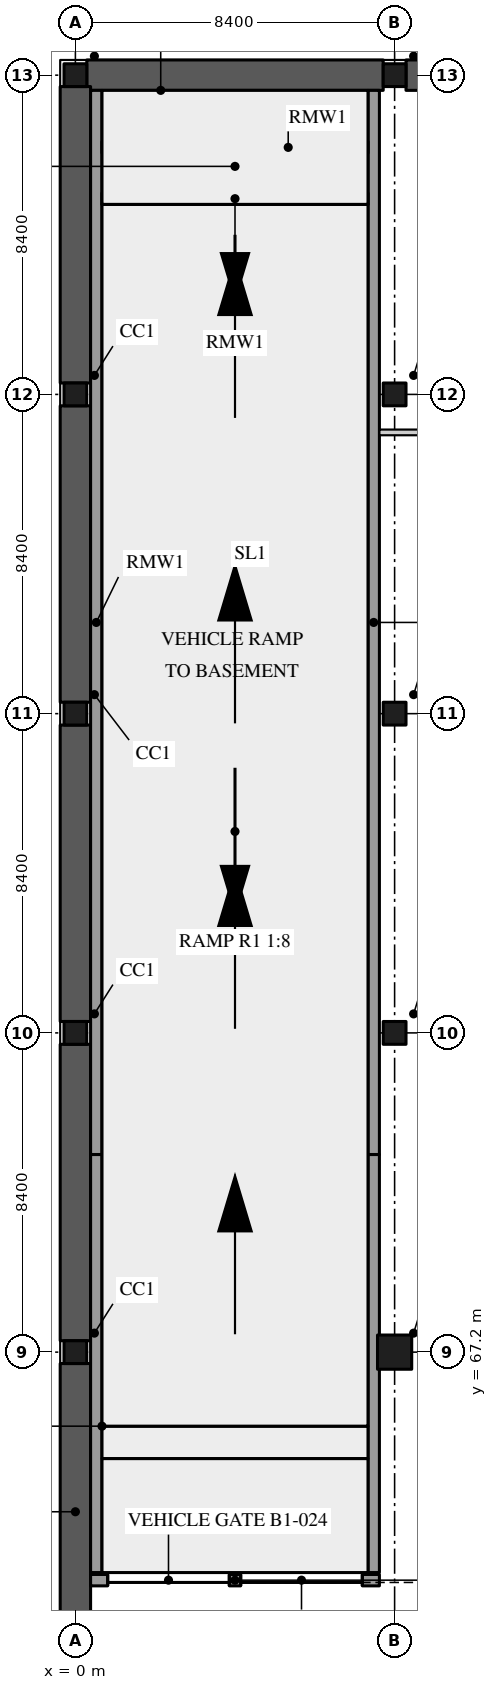
"""IFC4 building model, lengths in metres.
Left out: names, types, materials, properties, quantities, classifications, styles, units other than length and angle.
Written with IfcOpenShell. Run it as: python <this file> out.ifc"""

import sys

from ifc_helpers import new_model, si_unit, direction, frame, frame_2d, origin, origin_2d, place, context, subcontext, project, spatial, rectangle, extrude, element, fill, save


model = new_model("IFC4")
c1 = context("Model", 3, precision=1e-05, world=origin(), true_north=direction((0.0, 1.0)))
c2 = subcontext(c1, "Body", "Model", "MODEL_VIEW")
j1 = project(units=[si_unit("LENGTHUNIT", "METRE"), si_unit("PLANEANGLEUNIT", "RADIAN")], contexts=[c1])
p1 = place(None, origin())
s1 = spatial("IfcSite", under=j1, at=p1, CompositionType="ELEMENT")
p2 = place(p1, origin())
s2 = spatial("IfcBuilding", under=s1, at=p2, CompositionType="ELEMENT")
p3 = place(p2, frame((0.0, 0.0, -4.5)))
s3 = spatial("IfcBuildingStorey", under=s2, at=p3, CompositionType="ELEMENT", Elevation=-4.5)
for number, where, z_axis, x_axis in (
    (1, (0.0, 67.2, 0.0), (0.0, 0.0, 1.0), (1.0, 0.0, 0.0)),
    (2, (0.0, 75.6, 0.0), (0.0, 0.0, 1.0), (1.0, 0.0, 0.0)),
    (3, (0.0, 84.0, 0.0), (0.0, 0.0, 1.0), (1.0, 0.0, 0.0)),
    (4, (0.0, 92.4, 0.0), (0.0, 0.0, 1.0), (1.0, 0.0, 0.0)),
    (5, (0.0, 100.8, 0.0), (0.0, 0.0, 1.0), (1.0, 0.0, 0.0)),
):
    element("IfcColumn", number, at=place(p3, frame(where, z_axis=z_axis, x_axis=x_axis)), inside=s3, PredefinedType="COLUMN", context=c2, shape_type="SweptSolid", body=[
        extrude(rectangle(XDim=0.6, YDim=0.6, at=origin_2d()), origin(), (0.0, 0.0, 1.0), 4.05),
    ])
p4 = place(p3, frame((8.4, 67.2, 0.0), z_axis=(0.0, 0.0, 1.0), x_axis=(1.0, 0.0, 0.0)))
e6 = element("IfcColumn", 6, at=p4, inside=s3, PredefinedType="COLUMN", context=c2, shape_type="SweptSolid", body=[
    extrude(rectangle(XDim=0.9, YDim=0.9, at=origin_2d()), origin(), (0.0, 0.0, 1.0), 4.05),
])
for number, where, z_axis, x_axis in (
    (7, (8.4, 75.6, 0.0), (0.0, 0.0, 1.0), (1.0, 0.0, 0.0)),
    (8, (8.4, 84.0, 0.0), (0.0, 0.0, 1.0), (1.0, 0.0, 0.0)),
    (9, (8.4, 92.4, 0.0), (0.0, 0.0, 1.0), (1.0, 0.0, 0.0)),
    (10, (8.4, 100.8, 0.0), (0.0, 0.0, 1.0), (1.0, 0.0, 0.0)),
):
    element("IfcColumn", number, at=place(p3, frame(where, z_axis=z_axis, x_axis=x_axis)), inside=s3, PredefinedType="COLUMN", context=c2, shape_type="SweptSolid", body=[
        extrude(rectangle(XDim=0.6, YDim=0.6, at=origin_2d()), origin(), (0.0, 0.0, 1.0), 4.05),
    ])
for number, where, z_axis, x_axis in (
    (11, (0.3, 100.8, 0.0), (0.0, 0.0, 1.0), (1.0, 0.0, 0.0)),
    (12, (8.7, 100.8, 0.0), (0.0, 0.0, 1.0), (1.0, 0.0, 0.0)),
):
    element("IfcWall", number, at=place(p3, frame(where, z_axis=z_axis, x_axis=x_axis)), inside=s3, PredefinedType="SOLIDWALL", context=c2, shape_type="SweptSolid", body=[
        extrude(rectangle(XDim=7.8, YDim=0.8, at=frame_2d((3.9, 0.0))), origin(), (0.0, 0.0, 1.0), 4.05),
    ])
p5 = place(p3, frame((0.0, 59.1, 0.0), z_axis=(0.0, 0.0, 1.0), x_axis=(0.0, 1.0, 0.0)))
e13 = element("IfcWall", 13, at=p5, inside=s3, PredefinedType="SOLIDWALL", context=c2, shape_type="SweptSolid", body=[
    extrude(rectangle(XDim=7.8, YDim=0.8, at=frame_2d((3.9, 0.0))), origin(), (0.0, 0.0, 1.0), 4.05),
])
for number, where, z_axis, x_axis in (
    (14, (0.0, 67.5, 0.0), (0.0, 0.0, 1.0), (0.0, 1.0, 0.0)),
    (15, (0.0, 75.9, 0.0), (0.0, 0.0, 1.0), (0.0, 1.0, 0.0)),
    (16, (0.0, 84.3, 0.0), (0.0, 0.0, 1.0), (0.0, 1.0, 0.0)),
    (17, (0.0, 92.7, 0.0), (0.0, 0.0, 1.0), (0.0, 1.0, 0.0)),
):
    element("IfcWall", number, at=place(p3, frame(where, z_axis=z_axis, x_axis=x_axis)), inside=s3, PredefinedType="SOLIDWALL", context=c2, shape_type="SweptSolid", body=[
        extrude(rectangle(XDim=7.8, YDim=0.8, at=frame_2d((3.9, 0.0))), origin(), (0.0, 0.0, 1.0), 4.05),
    ])
p6 = place(p3, frame((8.0, 91.4, 0.0), z_axis=(0.0, 0.0, 1.0), x_axis=(1.0, 0.0, 0.0)))
e18 = element("IfcWall", 18, at=p6, inside=s3, PredefinedType="PARTITIONING", context=c2, shape_type="SweptSolid", body=[
    extrude(rectangle(XDim=33.475, YDim=0.15, at=frame_2d((16.738, 0.0))), origin(), (0.0, 0.0, 1.0), 4.05),
])
p7 = place(p6, frame((11.4, 0.0, 0.0)))
e19 = element("IfcOpeningElement", 19, at=p7, cuts=e18, PredefinedType="OPENING", context=c2, shape_type="SweptSolid", body=[
    extrude(rectangle(XDim=1.2, YDim=2.1, at=frame_2d((0.6, 1.05))), frame((0.0, 0.085, 0.0), z_axis=(0.0, -1.0, 0.0), x_axis=(1.0, 0.0, 0.0)), (0.0, 0.0, 1.0), 0.17),
])
p8 = place(p6, frame((24.0, 0.0, 0.0)))
e20 = element("IfcOpeningElement", 20, at=p8, cuts=e18, PredefinedType="OPENING", context=c2, shape_type="SweptSolid", body=[
    extrude(rectangle(XDim=1.2, YDim=2.1, at=frame_2d((0.6, 1.05))), frame((0.0, 0.085, 0.0), z_axis=(0.0, -1.0, 0.0), x_axis=(1.0, 0.0, 0.0)), (0.0, 0.0, 1.0), 0.17),
])
p9 = place(p3, frame((0.55, 61.4, 0.0), z_axis=(0.0, 0.0, 1.0), x_axis=(0.0, 1.0, 0.0)))
e21 = element("IfcWall", 21, at=p9, inside=s3, PredefinedType="SOLIDWALL", context=c2, shape_type="SweptSolid", body=[
    extrude(rectangle(XDim=11.0, YDim=0.3, at=frame_2d((5.5, 0.0))), origin(), (0.0, 0.0, 1.0), 4.05),
])
p10 = place(p3, frame((0.55, 72.4, 0.0), z_axis=(0.0, 0.0, 1.0), x_axis=(0.0, 1.0, 0.0)))
e22 = element("IfcWall", 22, at=p10, inside=s3, PredefinedType="SOLIDWALL", context=c2, shape_type="SweptSolid", body=[
    extrude(rectangle(XDim=28.0, YDim=0.3, at=frame_2d((14.0, 0.0))), origin(), (0.0, 0.0, 1.0), 4.5),
])
p11 = place(p3, frame((7.85, 61.4, 0.0), z_axis=(0.0, 0.0, 1.0), x_axis=(0.0, 1.0, 0.0)))
e23 = element("IfcWall", 23, at=p11, inside=s3, PredefinedType="SOLIDWALL", context=c2, shape_type="SweptSolid", body=[
    extrude(rectangle(XDim=11.0, YDim=0.3, at=frame_2d((5.5, 0.0))), origin(), (0.0, 0.0, 1.0), 4.05),
])
p12 = place(p3, frame((7.85, 72.4, 0.0), z_axis=(0.0, 0.0, 1.0), x_axis=(0.0, 1.0, 0.0)))
e24 = element("IfcWall", 24, at=p12, inside=s3, PredefinedType="SOLIDWALL", context=c2, shape_type="SweptSolid", body=[
    extrude(rectangle(XDim=28.0, YDim=0.3, at=frame_2d((14.0, 0.0))), origin(), (0.0, 0.0, 1.0), 4.5),
])
p13 = place(p3, frame((7.7, 97.55, 0.0), z_axis=(0.0, 0.0, 1.0), x_axis=(-1.0, 0.0, 0.0)))
e25 = element("IfcWall", 25, at=p13, inside=s3, PredefinedType="SOLIDWALL", context=c2, shape_type="SweptSolid", body=[
    extrude(rectangle(XDim=7.0, YDim=0.3, at=frame_2d((3.5, 0.0))), origin(), (0.0, 0.0, 1.0), 4.012),
])
p14 = place(p3, frame((7.7, 98.9, 0.0), z_axis=(0.0, 0.0, 1.0), x_axis=(-1.0, 0.0, 0.0)))
e26 = element("IfcWall", 26, at=p14, inside=s3, PredefinedType="SOLIDWALL", context=c2, shape_type="SweptSolid", body=[
    extrude(rectangle(XDim=7.0, YDim=0.3, at=frame_2d((3.5, 0.0))), origin(), (0.0, 0.0, 1.0), 4.097),
])
p15 = place(p3, frame((8.0, 61.2, 0.0), z_axis=(0.0, 0.0, 1.0), x_axis=(-1.0, 0.0, 0.0)))
e27 = element("IfcWall", 27, at=p15, inside=s3, PredefinedType="SOLIDWALL", context=c2, shape_type="SweptSolid", body=[
    extrude(rectangle(XDim=7.6, YDim=0.3, at=frame_2d((3.8, 0.0))), origin(), (0.0, 0.0, 1.0), 4.05),
])
p16 = place(p15, frame((0.45, 0.0, 0.0)))
e28 = element("IfcOpeningElement", 28, at=p16, cuts=e27, PredefinedType="OPENING", context=c2, shape_type="SweptSolid", body=[
    extrude(rectangle(XDim=3.2, YDim=3.0, at=frame_2d((1.6, 1.5))), frame((0.0, 0.16, 0.0), z_axis=(0.0, -1.0, 0.0), x_axis=(1.0, 0.0, 0.0)), (0.0, 0.0, 1.0), 0.32),
])
p17 = place(p15, frame((3.95, 0.0, 0.0)))
e29 = element("IfcOpeningElement", 29, at=p17, cuts=e27, PredefinedType="OPENING", context=c2, shape_type="SweptSolid", body=[
    extrude(rectangle(XDim=3.2, YDim=3.0, at=frame_2d((1.6, 1.5))), frame((0.0, 0.16, 0.0), z_axis=(0.0, -1.0, 0.0), x_axis=(1.0, 0.0, 0.0)), (0.0, 0.0, 1.0), 0.32),
])
p18 = place(p16, origin())
e30 = element("IfcDoor", 30, at=p18, inside=s3, OperationType="SLIDING_TO_LEFT", PredefinedType="GATE", context=c2, shape_type="SweptSolid", body=[
    extrude(rectangle(XDim=3.2, YDim=3.0, at=frame_2d((1.6, 1.5))), frame((0.0, 0.025, 0.0), z_axis=(0.0, -1.0, 0.0), x_axis=(1.0, 0.0, 0.0)), (0.0, 0.0, 1.0), 0.05),
])
fill(e28, e30)
p19 = place(p17, origin())
e31 = element("IfcDoor", 31, at=p19, inside=s3, OperationType="SLIDING_TO_LEFT", PredefinedType="GATE", context=c2, shape_type="SweptSolid", body=[
    extrude(rectangle(XDim=3.2, YDim=3.0, at=frame_2d((1.6, 1.5))), frame((0.0, 0.025, 0.0), z_axis=(0.0, -1.0, 0.0), x_axis=(1.0, 0.0, 0.0)), (0.0, 0.0, 1.0), 0.05),
])
fill(e29, e31)
save(model, sys.argv[1])
